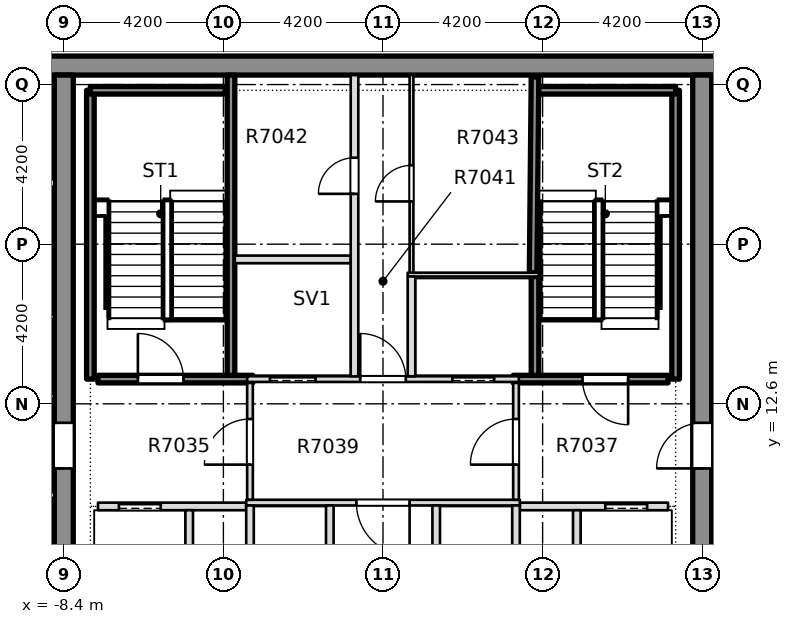
"""IFC4 building model, lengths in metres.
Left out: names, types, materials, properties, quantities, classifications, styles, units other than length and angle.
Written with IfcOpenShell. Run it as: python <this file> out.ifc"""

import sys

from ifc_helpers import new_model, si_unit, direction, frame, frame_2d, origin, place, context, subcontext, project, spatial, rectangle, extrude, element, fill, save


model = new_model("IFC4")
c1 = context("Model", 3, precision=1e-05, world=origin(), true_north=direction((0.0, 1.0)))
c2 = subcontext(c1, "Body", "Model", "MODEL_VIEW")
j1 = project(units=[si_unit("LENGTHUNIT", "METRE"), si_unit("PLANEANGLEUNIT", "RADIAN")], contexts=[c1])
p1 = place(None, origin())
s1 = spatial("IfcSite", under=j1, at=p1, CompositionType="ELEMENT")
p2 = place(p1, origin())
s2 = spatial("IfcBuilding", under=s1, at=p2, CompositionType="ELEMENT")
p3 = place(p2, frame((0.0, 0.0, 264.85)))
s3 = spatial("IfcBuildingStorey", under=s2, at=p3, CompositionType="ELEMENT", Elevation=264.85)
p4 = place(p3, frame((-12.1, 21.5, -0.5), z_axis=(0.0, 0.0, 1.0), x_axis=(1.0, 0.0, 0.0)))
e1 = element("IfcWall", 1, at=p4, inside=s3, PredefinedType="SHEAR", context=c2, shape_type="SweptSolid", body=[
    extrude(rectangle(XDim=24.2, YDim=0.5, at=frame_2d((12.1, 0.0))), origin(), (0.0, 0.0, 1.0), 4.5),
])
p5 = place(p3, frame((-8.4, -7.9, -0.5), z_axis=(0.0, 0.0, 1.0), x_axis=(0.0, 1.0, 0.0)))
e2 = element("IfcWall", 2, at=p5, inside=s3, PredefinedType="SHEAR", context=c2, shape_type="SweptSolid", body=[
    extrude(rectangle(XDim=29.15, YDim=0.5, at=frame_2d((14.575, 0.0))), origin(), (0.0, 0.0, 1.0), 4.5),
])
p6 = place(p5, frame((18.8, 0.0, 0.5)))
e3 = element("IfcOpeningElement", 3, at=p6, cuts=e2, PredefinedType="OPENING", context=c2, shape_type="SweptSolid", body=[
    extrude(rectangle(XDim=1.2, YDim=2.1, at=frame_2d((0.6, 1.05))), frame((0.0, 0.26, 0.0), z_axis=(0.0, -1.0, 0.0), x_axis=(1.0, 0.0, 0.0)), (0.0, 0.0, 1.0), 0.52),
])
p7 = place(p3, frame((8.4, -7.9, -0.5), z_axis=(0.0, 0.0, 1.0), x_axis=(0.0, 1.0, 0.0)))
e4 = element("IfcWall", 4, at=p7, inside=s3, PredefinedType="SHEAR", context=c2, shape_type="SweptSolid", body=[
    extrude(rectangle(XDim=29.15, YDim=0.5, at=frame_2d((14.575, 0.0))), origin(), (0.0, 0.0, 1.0), 4.5),
])
p8 = place(p7, frame((18.8, 0.0, 0.5)))
e5 = element("IfcOpeningElement", 5, at=p8, cuts=e4, PredefinedType="OPENING", context=c2, shape_type="SweptSolid", body=[
    extrude(rectangle(XDim=1.2, YDim=2.1, at=frame_2d((0.6, 1.05))), frame((0.0, 0.26, 0.0), z_axis=(0.0, -1.0, 0.0), x_axis=(1.0, 0.0, 0.0)), (0.0, 0.0, 1.0), 0.52),
])
p9 = place(p3, frame((-7.5, 9.9, 0.0), z_axis=(0.0, 0.0, 1.0), x_axis=(1.0, 0.0, 0.0)))
e6 = element("IfcWall", 6, at=p9, inside=s3, PredefinedType="PARTITIONING", context=c2, shape_type="SweptSolid", body=[
    extrude(rectangle(XDim=3.9, YDim=0.2, at=frame_2d((1.95, 0.0))), origin(), (0.0, 0.0, 1.0), 4.0),
])
p10 = place(p9, frame((0.55, 0.0, 0.0)))
e7 = element("IfcOpeningElement", 7, at=p10, cuts=e6, PredefinedType="OPENING", context=c2, shape_type="SweptSolid", body=[
    extrude(rectangle(XDim=1.1, YDim=2.1, at=frame_2d((0.55, 1.05))), frame((0.0, 0.11, 0.0), z_axis=(0.0, -1.0, 0.0), x_axis=(1.0, 0.0, 0.0)), (0.0, 0.0, 1.0), 0.22),
])
p11 = place(p3, frame((3.6, 9.9, 0.0), z_axis=(0.0, 0.0, 1.0), x_axis=(1.0, 0.0, 0.0)))
e8 = element("IfcWall", 8, at=p11, inside=s3, PredefinedType="PARTITIONING", context=c2, shape_type="SweptSolid", body=[
    extrude(rectangle(XDim=3.9, YDim=0.2, at=frame_2d((1.95, 0.0))), origin(), (0.0, 0.0, 1.0), 4.0),
])
p12 = place(p11, frame((2.25, 0.0, 0.0)))
e9 = element("IfcOpeningElement", 9, at=p12, cuts=e8, PredefinedType="OPENING", context=c2, shape_type="SweptSolid", body=[
    extrude(rectangle(XDim=1.1, YDim=2.1, at=frame_2d((0.55, 1.05))), frame((0.0, 0.11, 0.0), z_axis=(0.0, -1.0, 0.0), x_axis=(1.0, 0.0, 0.0)), (0.0, 0.0, 1.0), 0.22),
])
p13 = place(p3, frame((-3.6, 10.0, 0.0), z_axis=(0.0, 0.0, 1.0), x_axis=(1.0, 0.0, 0.0)))
e10 = element("IfcWall", 10, at=p13, inside=s3, PredefinedType="PARTITIONING", context=c2, shape_type="SweptSolid", body=[
    extrude(rectangle(XDim=7.2, YDim=0.15, at=frame_2d((3.6, 0.0))), origin(), (0.0, 0.0, 1.0), 4.0),
])
p14 = place(p13, frame((2.9, 0.0, 0.0)))
e11 = element("IfcOpeningElement", 11, at=p14, cuts=e10, PredefinedType="OPENING", context=c2, shape_type="SweptSolid", body=[
    extrude(rectangle(XDim=1.4, YDim=2.1, at=frame_2d((0.7, 1.05))), frame((0.0, 0.085, 0.0), z_axis=(0.0, -1.0, 0.0), x_axis=(1.0, 0.0, 0.0)), (0.0, 0.0, 1.0), 0.17),
])
p15 = place(p3, frame((-7.5, 13.25, 0.0), z_axis=(0.0, 0.0, 1.0), x_axis=(1.0, 0.0, 0.0)))
e12 = element("IfcWall", 12, at=p15, inside=s3, PredefinedType="SOLIDWALL", context=c2, shape_type="SweptSolid", body=[
    extrude(rectangle(XDim=4.075, YDim=0.2, at=frame_2d((2.038, 0.0))), origin(), (0.0, 0.0, 1.0), 4.0),
])
p16 = place(p15, frame((1.05, 0.0, 0.0)))
e13 = element("IfcOpeningElement", 13, at=p16, cuts=e12, PredefinedType="OPENING", context=c2, shape_type="SweptSolid", body=[
    extrude(rectangle(XDim=1.2, YDim=2.1, at=frame_2d((0.6, 1.05))), frame((0.0, 0.11, 0.0), z_axis=(0.0, -1.0, 0.0), x_axis=(1.0, 0.0, 0.0)), (0.0, 0.0, 1.0), 0.22),
])
p17 = place(p3, frame((-3.575, 13.25, 0.0), z_axis=(0.0, 0.0, 1.0), x_axis=(1.0, 0.0, 0.0)))
e14 = element("IfcWall", 14, at=p17, inside=s3, PredefinedType="PARTITIONING", context=c2, shape_type="SweptSolid", body=[
    extrude(rectangle(XDim=7.15, YDim=0.15, at=frame_2d((3.575, 0.0))), origin(), (0.0, 0.0, 1.0), 4.0),
])
p18 = place(p17, frame((0.6, 0.0, 0.0)))
e15 = element("IfcOpeningElement", 15, at=p18, cuts=e14, PredefinedType="OPENING", context=c2, shape_type="SweptSolid", body=[
    extrude(rectangle(XDim=1.2, YDim=2.1, at=frame_2d((0.6, 1.05))), frame((0.0, 0.085, 0.0), z_axis=(0.0, -1.0, 0.0), x_axis=(1.0, 0.0, 0.0)), (0.0, 0.0, 1.0), 0.17),
])
p19 = place(p17, frame((5.4, 0.0, 0.0)))
e16 = element("IfcOpeningElement", 16, at=p19, cuts=e14, PredefinedType="OPENING", context=c2, shape_type="SweptSolid", body=[
    extrude(rectangle(XDim=1.1, YDim=2.1, at=frame_2d((0.55, 1.05))), frame((0.0, 0.085, 0.0), z_axis=(0.0, -1.0, 0.0), x_axis=(1.0, 0.0, 0.0)), (0.0, 0.0, 1.0), 0.17),
])
p20 = place(p17, frame((2.975, 0.0, 0.0)))
e17 = element("IfcOpeningElement", 17, at=p20, cuts=e14, PredefinedType="OPENING", context=c2, shape_type="SweptSolid", body=[
    extrude(rectangle(XDim=1.2, YDim=2.1, at=frame_2d((0.6, 1.05))), frame((0.0, 0.085, 0.0), z_axis=(0.0, -1.0, 0.0), x_axis=(1.0, 0.0, 0.0)), (0.0, 0.0, 1.0), 0.17),
])
p21 = place(p3, frame((3.425, 13.25, 0.0), z_axis=(0.0, 0.0, 1.0), x_axis=(1.0, 0.0, 0.0)))
e18 = element("IfcWall", 18, at=p21, inside=s3, PredefinedType="SOLIDWALL", context=c2, shape_type="SweptSolid", body=[
    extrude(rectangle(XDim=4.075, YDim=0.2, at=frame_2d((2.038, 0.0))), origin(), (0.0, 0.0, 1.0), 4.0),
])
p22 = place(p21, frame((1.825, 0.0, 0.0)))
e19 = element("IfcOpeningElement", 19, at=p22, cuts=e18, PredefinedType="OPENING", context=c2, shape_type="SweptSolid", body=[
    extrude(rectangle(XDim=1.2, YDim=2.1, at=frame_2d((0.6, 1.05))), frame((0.0, 0.11, 0.0), z_axis=(0.0, -1.0, 0.0), x_axis=(1.0, 0.0, 0.0)), (0.0, 0.0, 1.0), 0.22),
])
p23 = place(p3, frame((0.65, 16.0, 0.0), z_axis=(0.0, 0.0, 1.0), x_axis=(1.0, 0.0, 0.0)))
e20 = element("IfcWall", 20, at=p23, inside=s3, PredefinedType="PARTITIONING", context=c2, shape_type="SweptSolid", body=[
    extrude(rectangle(XDim=3.45, YDim=0.1, at=frame_2d((1.725, 0.0))), origin(), (0.0, 0.0, 1.0), 4.0),
])
p24 = place(p3, frame((-3.9, 16.4, 0.0), z_axis=(0.0, 0.0, 1.0), x_axis=(1.0, 0.0, 0.0)))
e21 = element("IfcWall", 21, at=p24, inside=s3, PredefinedType="PARTITIONING", context=c2, shape_type="SweptSolid", body=[
    extrude(rectangle(XDim=3.05, YDim=0.2, at=frame_2d((1.525, 0.0))), origin(), (0.0, 0.0, 1.0), 4.0),
])
p25 = place(p3, frame((-5.1, 7.075, 0.0), z_axis=(0.0, 0.0, 1.0), x_axis=(0.0, 1.0, 0.0)))
e22 = element("IfcWall", 22, at=p25, inside=s3, PredefinedType="PARTITIONING", context=c2, shape_type="SweptSolid", body=[
    extrude(rectangle(XDim=2.725, YDim=0.2, at=frame_2d((1.363, 0.0))), origin(), (0.0, 0.0, 1.0), 4.0),
])
p26 = place(p3, frame((-4.0, 13.35, 0.0), z_axis=(0.0, 0.0, 1.0), x_axis=(0.0, 1.0, 0.0)))
e23 = element("IfcWall", 23, at=p26, inside=s3, PredefinedType="SOLIDWALL", context=c2, shape_type="SweptSolid", body=[
    extrude(rectangle(XDim=7.899, YDim=0.2, at=frame_2d((3.949, 0.0))), origin(), (0.0, 0.0, 1.0), 4.0),
])
p27 = place(p3, frame((-3.5, 7.075, 0.0), z_axis=(0.0, 0.0, 1.0), x_axis=(0.0, 1.0, 0.0)))
e24 = element("IfcWall", 24, at=p27, inside=s3, PredefinedType="PARTITIONING", context=c2, shape_type="SweptSolid", body=[
    extrude(rectangle(XDim=2.85, YDim=0.2, at=frame_2d((1.425, 0.0))), origin(), (0.0, 0.0, 1.0), 4.0),
])
p28 = place(p3, frame((-3.5, 10.075, 0.0), z_axis=(0.0, 0.0, 1.0), x_axis=(0.0, 1.0, 0.0)))
e25 = element("IfcWall", 25, at=p28, inside=s3, PredefinedType="PARTITIONING", context=c2, shape_type="SweptSolid", body=[
    extrude(rectangle(XDim=3.075, YDim=0.15, at=frame_2d((1.538, 0.0))), origin(), (0.0, 0.0, 1.0), 4.0),
])
p29 = place(p28, frame((0.925, 0.0, 0.0)))
e26 = element("IfcOpeningElement", 26, at=p29, cuts=e25, PredefinedType="OPENING", context=c2, shape_type="SweptSolid", body=[
    extrude(rectangle(XDim=1.2, YDim=2.1, at=frame_2d((0.6, 1.05))), frame((0.0, 0.085, 0.0), z_axis=(0.0, -1.0, 0.0), x_axis=(1.0, 0.0, 0.0)), (0.0, 0.0, 1.0), 0.17),
])
p30 = place(p3, frame((-1.4, 7.075, 0.0), z_axis=(0.0, 0.0, 1.0), x_axis=(0.0, 1.0, 0.0)))
e27 = element("IfcWall", 27, at=p30, inside=s3, PredefinedType="PARTITIONING", context=c2, shape_type="SweptSolid", body=[
    extrude(rectangle(XDim=2.85, YDim=0.2, at=frame_2d((1.425, 0.0))), origin(), (0.0, 0.0, 1.0), 4.0),
])
p31 = place(p3, frame((-0.75, 13.325, 0.0), z_axis=(0.0, 0.0, 1.0), x_axis=(0.0, 1.0, 0.0)))
e28 = element("IfcWall", 28, at=p31, inside=s3, PredefinedType="PARTITIONING", context=c2, shape_type="SweptSolid", body=[
    extrude(rectangle(XDim=7.924, YDim=0.2, at=frame_2d((3.962, 0.0))), origin(), (0.0, 0.0, 1.0), 4.0),
])
p32 = place(p31, frame((4.8, 0.0, 0.0)))
e29 = element("IfcOpeningElement", 29, at=p32, cuts=e28, PredefinedType="OPENING", context=c2, shape_type="SweptSolid", body=[
    extrude(rectangle(XDim=0.95, YDim=2.1, at=frame_2d((0.475, 1.05))), frame((0.0, 0.11, 0.0), z_axis=(0.0, -1.0, 0.0), x_axis=(1.0, 0.0, 0.0)), (0.0, 0.0, 1.0), 0.22),
])
p33 = place(p3, frame((0.75, 13.325, 0.0), z_axis=(0.0, 0.0, 1.0), x_axis=(0.0, 1.0, 0.0)))
e30 = element("IfcWall", 30, at=p33, inside=s3, PredefinedType="PARTITIONING", context=c2, shape_type="SweptSolid", body=[
    extrude(rectangle(XDim=2.625, YDim=0.2, at=frame_2d((1.312, 0.0))), origin(), (0.0, 0.0, 1.0), 4.0),
])
p34 = place(p3, frame((0.75, 16.05, 0.0), z_axis=(0.0, 0.0, 1.0), x_axis=(0.0, 1.0, 0.0)))
e31 = element("IfcWall", 31, at=p34, inside=s3, PredefinedType="PARTITIONING", context=c2, shape_type="SweptSolid", body=[
    extrude(rectangle(XDim=5.199, YDim=0.1, at=frame_2d((2.6, 0.0))), origin(), (0.0, 0.0, 1.0), 4.0),
])
p35 = place(p34, frame((1.875, 0.0, 0.0)))
e32 = element("IfcOpeningElement", 32, at=p35, cuts=e31, PredefinedType="OPENING", context=c2, shape_type="SweptSolid", body=[
    extrude(rectangle(XDim=0.95, YDim=2.1, at=frame_2d((0.475, 1.05))), frame((0.0, 0.06, 0.0), z_axis=(0.0, -1.0, 0.0), x_axis=(1.0, 0.0, 0.0)), (0.0, 0.0, 1.0), 0.12),
])
for number, where, z_axis, x_axis in (
    (33, (1.4, 7.075, 0.0), (0.0, 0.0, 1.0), (0.0, 1.0, 0.0)),
    (34, (3.5, 7.075, 0.0), (0.0, 0.0, 1.0), (0.0, 1.0, 0.0)),
):
    element("IfcWall", number, at=place(p3, frame(where, z_axis=z_axis, x_axis=x_axis)), inside=s3, PredefinedType="PARTITIONING", context=c2, shape_type="SweptSolid", body=[
        extrude(rectangle(XDim=2.85, YDim=0.2, at=frame_2d((1.425, 0.0))), origin(), (0.0, 0.0, 1.0), 4.0),
    ])
p36 = place(p3, frame((3.5, 10.075, 0.0), z_axis=(0.0, 0.0, 1.0), x_axis=(0.0, 1.0, 0.0)))
e35 = element("IfcWall", 35, at=p36, inside=s3, PredefinedType="PARTITIONING", context=c2, shape_type="SweptSolid", body=[
    extrude(rectangle(XDim=3.075, YDim=0.15, at=frame_2d((1.538, 0.0))), origin(), (0.0, 0.0, 1.0), 4.0),
])
p37 = place(p36, frame((0.925, 0.0, 0.0)))
e36 = element("IfcOpeningElement", 36, at=p37, cuts=e35, PredefinedType="OPENING", context=c2, shape_type="SweptSolid", body=[
    extrude(rectangle(XDim=1.2, YDim=2.1, at=frame_2d((0.6, 1.05))), frame((0.0, 0.085, 0.0), z_axis=(0.0, -1.0, 0.0), x_axis=(1.0, 0.0, 0.0)), (0.0, 0.0, 1.0), 0.17),
])
p38 = place(p3, frame((4.0, 13.35, 0.0), z_axis=(0.0, 0.0, 1.0), x_axis=(0.0, 1.0, 0.0)))
e37 = element("IfcWall", 37, at=p38, inside=s3, PredefinedType="SOLIDWALL", context=c2, shape_type="SweptSolid", body=[
    extrude(rectangle(XDim=2.6, YDim=0.2, at=frame_2d((1.3, 0.0))), origin(), (0.0, 0.0, 1.0), 4.0),
])
p39 = place(p3, frame((3.95, 16.05, 0.0), z_axis=(0.0, 0.0, 1.0), x_axis=(0.009719787395, 0.999952761751, 0.0)))
e38 = element("IfcWall", 38, at=p39, inside=s3, PredefinedType="SOLIDWALL", context=c2, shape_type="SweptSolid", body=[
    extrude(rectangle(XDim=5.149, YDim=0.2, at=frame_2d((2.575, 0.0))), origin(), (0.0, 0.0, 1.0), 4.0),
])
p40 = place(p3, frame((5.1, 7.075, 0.0), z_axis=(0.0, 0.0, 1.0), x_axis=(0.0, 1.0, 0.0)))
e39 = element("IfcWall", 39, at=p40, inside=s3, PredefinedType="PARTITIONING", context=c2, shape_type="SweptSolid", body=[
    extrude(rectangle(XDim=2.725, YDim=0.2, at=frame_2d((1.363, 0.0))), origin(), (0.0, 0.0, 1.0), 4.0),
])
p41 = place(p3, frame((-12.099, 10.2, 0.0), z_axis=(0.0, 0.0, 1.0), x_axis=(1.0, 0.0, 0.0)))
e40 = element("IfcWall", 40, at=p41, inside=s3, PredefinedType="PARTITIONING", context=c2, shape_type="SweptSolid", body=[
    extrude(rectangle(XDim=3.448, YDim=0.15, at=frame_2d((1.724, 0.0))), origin(), (0.0, 0.0, 1.0), 4.0),
])
p42 = place(p3, frame((-12.099, 12.8, 0.0), z_axis=(0.0, 0.0, 1.0), x_axis=(1.0, 0.0, 0.0)))
e41 = element("IfcWall", 41, at=p42, inside=s3, PredefinedType="PARTITIONING", context=c2, shape_type="SweptSolid", body=[
    extrude(rectangle(XDim=3.448, YDim=0.1, at=frame_2d((1.724, 0.0))), origin(), (0.0, 0.0, 1.0), 2.5),
])
p43 = place(p3, frame((-12.099, 14.891, 0.0), z_axis=(0.0, 0.0, 1.0), x_axis=(1.0, 0.0, 0.0)))
e42 = element("IfcWall", 42, at=p43, inside=s3, PredefinedType="PARTITIONING", context=c2, shape_type="SweptSolid", body=[
    extrude(rectangle(XDim=3.448, YDim=0.1, at=frame_2d((1.724, 0.0))), origin(), (0.0, 0.0, 1.0), 4.0),
])
p44 = place(p3, frame((-12.099, 18.411, 0.0), z_axis=(0.0, 0.0, 1.0), x_axis=(1.0, 0.0, 0.0)))
e43 = element("IfcWall", 43, at=p44, inside=s3, PredefinedType="PARTITIONING", context=c2, shape_type="SweptSolid", body=[
    extrude(rectangle(XDim=3.448, YDim=0.2, at=frame_2d((1.724, 0.0))), origin(), (0.0, 0.0, 1.0), 4.0),
])
p45 = place(p3, frame((8.651, 10.2, 0.0), z_axis=(0.0, 0.0, 1.0), x_axis=(1.0, 0.0, 0.0)))
e44 = element("IfcWall", 44, at=p45, inside=s3, PredefinedType="PARTITIONING", context=c2, shape_type="SweptSolid", body=[
    extrude(rectangle(XDim=3.448, YDim=0.1, at=frame_2d((1.724, 0.0))), origin(), (0.0, 0.0, 1.0), 4.0),
])
p46 = place(p3, frame((8.651, 12.8, 0.0), z_axis=(0.0, 0.0, 1.0), x_axis=(1.0, 0.0, 0.0)))
e45 = element("IfcWall", 45, at=p46, inside=s3, PredefinedType="PARTITIONING", context=c2, shape_type="SweptSolid", body=[
    extrude(rectangle(XDim=3.448, YDim=0.15, at=frame_2d((1.724, 0.0))), origin(), (0.0, 0.0, 1.0), 2.5),
])
p47 = place(p3, frame((8.651, 18.56, 0.0), z_axis=(0.0, 0.0, 1.0), x_axis=(1.0, 0.0, 0.0)))
e46 = element("IfcWall", 46, at=p47, inside=s3, PredefinedType="PARTITIONING", context=c2, shape_type="SweptSolid", body=[
    extrude(rectangle(XDim=3.448, YDim=0.2, at=frame_2d((1.724, 0.0))), origin(), (0.0, 0.0, 1.0), 4.0),
])
p48 = place(p3, frame((-7.7, 13.25, 0.0), z_axis=(0.0, 0.0, 1.0), x_axis=(0.0, 1.0, 0.0)))
e47 = element("IfcWall", 47, at=p48, inside=s3, PredefinedType="SOLIDWALL", context=c2, shape_type="SweptSolid", body=[
    extrude(rectangle(XDim=7.6, YDim=0.2, at=frame_2d((3.8, 0.0))), origin(), (0.0, 0.0, 1.0), 4.0),
])
p49 = place(p3, frame((-7.7, 20.85, 0.0), z_axis=(0.0, 0.0, 1.0), x_axis=(1.0, 0.0, 0.0)))
e48 = element("IfcWall", 48, at=p49, inside=s3, PredefinedType="SOLIDWALL", context=c2, shape_type="SweptSolid", body=[
    extrude(rectangle(XDim=3.55, YDim=0.2, at=frame_2d((1.775, 0.0))), origin(), (0.0, 0.0, 1.0), 4.0),
])
p50 = place(p3, frame((7.7, 13.25, 0.0), z_axis=(0.0, 0.0, 1.0), x_axis=(0.0, 1.0, 0.0)))
e49 = element("IfcWall", 49, at=p50, inside=s3, PredefinedType="SOLIDWALL", context=c2, shape_type="SweptSolid", body=[
    extrude(rectangle(XDim=7.6, YDim=0.2, at=frame_2d((3.8, 0.0))), origin(), (0.0, 0.0, 1.0), 4.0),
])
p51 = place(p3, frame((4.1, 20.85, 0.0), z_axis=(0.0, 0.0, 1.0), x_axis=(1.0, 0.0, 0.0)))
e50 = element("IfcWall", 50, at=p51, inside=s3, PredefinedType="SOLIDWALL", context=c2, shape_type="SweptSolid", body=[
    extrude(rectangle(XDim=3.6, YDim=0.2, at=frame_2d((1.8, 0.0))), origin(), (0.0, 0.0, 1.0), 4.0),
])
p52 = place(p16, origin())
e51 = element("IfcDoor", 51, at=p52, inside=s3, OperationType="SINGLE_SWING_LEFT", PredefinedType="DOOR", context=c2, shape_type="SweptSolid", body=[
    extrude(rectangle(XDim=1.2, YDim=2.1, at=frame_2d((0.6, 1.05))), frame((0.0, 0.025, 0.0), z_axis=(0.0, -1.0, 0.0), x_axis=(1.0, 0.0, 0.0)), (0.0, 0.0, 1.0), 0.05),
])
fill(e13, e51)
p53 = place(p10, origin())
e52 = element("IfcDoor", 52, at=p53, inside=s3, OperationType="SLIDING_TO_RIGHT", PredefinedType="DOOR", context=c2, shape_type="SweptSolid", body=[
    extrude(rectangle(XDim=1.1, YDim=2.1, at=frame_2d((0.55, 1.05))), frame((0.0, 0.025, 0.0), z_axis=(0.0, -1.0, 0.0), x_axis=(1.0, 0.0, 0.0)), (0.0, 0.0, 1.0), 0.05),
])
fill(e7, e52)
p54 = place(p22, origin())
e53 = element("IfcDoor", 53, at=p54, inside=s3, OperationType="SINGLE_SWING_RIGHT", PredefinedType="DOOR", context=c2, shape_type="SweptSolid", body=[
    extrude(rectangle(XDim=1.2, YDim=2.1, at=frame_2d((0.6, 1.05))), frame((0.0, 0.025, 0.0), z_axis=(0.0, -1.0, 0.0), x_axis=(1.0, 0.0, 0.0)), (0.0, 0.0, 1.0), 0.05),
])
fill(e19, e53)
p55 = place(p12, origin())
e54 = element("IfcDoor", 54, at=p55, inside=s3, OperationType="SLIDING_TO_LEFT", PredefinedType="DOOR", context=c2, shape_type="SweptSolid", body=[
    extrude(rectangle(XDim=1.1, YDim=2.1, at=frame_2d((0.55, 1.05))), frame((0.0, 0.025, 0.0), z_axis=(0.0, -1.0, 0.0), x_axis=(1.0, 0.0, 0.0)), (0.0, 0.0, 1.0), 0.05),
])
fill(e9, e54)
p56 = place(p14, origin())
e55 = element("IfcDoor", 55, at=p56, inside=s3, OperationType="SINGLE_SWING_RIGHT", PredefinedType="DOOR", context=c2, shape_type="SweptSolid", body=[
    extrude(rectangle(XDim=1.4, YDim=2.1, at=frame_2d((0.7, 1.05))), frame((0.0, 0.025, 0.0), z_axis=(0.0, -1.0, 0.0), x_axis=(1.0, 0.0, 0.0)), (0.0, 0.0, 1.0), 0.05),
])
fill(e11, e55)
p57 = place(p18, origin())
e56 = element("IfcDoor", 56, at=p57, inside=s3, OperationType="SLIDING_TO_RIGHT", PredefinedType="DOOR", context=c2, shape_type="SweptSolid", body=[
    extrude(rectangle(XDim=1.2, YDim=2.1, at=frame_2d((0.6, 1.05))), frame((0.0, 0.025, 0.0), z_axis=(0.0, -1.0, 0.0), x_axis=(1.0, 0.0, 0.0)), (0.0, 0.0, 1.0), 0.05),
])
fill(e15, e56)
p58 = place(p19, origin())
e57 = element("IfcDoor", 57, at=p58, inside=s3, OperationType="SLIDING_TO_LEFT", PredefinedType="DOOR", context=c2, shape_type="SweptSolid", body=[
    extrude(rectangle(XDim=1.1, YDim=2.1, at=frame_2d((0.55, 1.05))), frame((0.0, 0.025, 0.0), z_axis=(0.0, -1.0, 0.0), x_axis=(1.0, 0.0, 0.0)), (0.0, 0.0, 1.0), 0.05),
])
fill(e16, e57)
p59 = place(p20, origin())
e58 = element("IfcDoor", 58, at=p59, inside=s3, OperationType="SINGLE_SWING_RIGHT", PredefinedType="DOOR", context=c2, shape_type="SweptSolid", body=[
    extrude(rectangle(XDim=1.2, YDim=2.1, at=frame_2d((0.6, 1.05))), frame((0.0, 0.025, 0.0), z_axis=(0.0, -1.0, 0.0), x_axis=(1.0, 0.0, 0.0)), (0.0, 0.0, 1.0), 0.05),
])
fill(e17, e58)
p60 = place(p32, origin())
e59 = element("IfcDoor", 59, at=p60, inside=s3, OperationType="SINGLE_SWING_RIGHT", PredefinedType="DOOR", context=c2, shape_type="SweptSolid", body=[
    extrude(rectangle(XDim=0.95, YDim=2.1, at=frame_2d((0.475, 1.05))), frame((0.0, 0.025, 0.0), z_axis=(0.0, -1.0, 0.0), x_axis=(1.0, 0.0, 0.0)), (0.0, 0.0, 1.0), 0.05),
])
fill(e29, e59)
p61 = place(p35, origin())
e60 = element("IfcDoor", 60, at=p61, inside=s3, OperationType="SINGLE_SWING_LEFT", PredefinedType="DOOR", context=c2, shape_type="SweptSolid", body=[
    extrude(rectangle(XDim=0.95, YDim=2.1, at=frame_2d((0.475, 1.05))), frame((0.0, 0.025, 0.0), z_axis=(0.0, -1.0, 0.0), x_axis=(1.0, 0.0, 0.0)), (0.0, 0.0, 1.0), 0.05),
])
fill(e32, e60)
p62 = place(p29, origin())
e61 = element("IfcDoor", 61, at=p62, inside=s3, OperationType="SINGLE_SWING_RIGHT", PredefinedType="DOOR", context=c2, shape_type="SweptSolid", body=[
    extrude(rectangle(XDim=1.2, YDim=2.1, at=frame_2d((0.6, 1.05))), frame((0.0, 0.025, 0.0), z_axis=(0.0, -1.0, 0.0), x_axis=(1.0, 0.0, 0.0)), (0.0, 0.0, 1.0), 0.05),
])
fill(e26, e61)
p63 = place(p37, origin())
e62 = element("IfcDoor", 62, at=p63, inside=s3, OperationType="SINGLE_SWING_LEFT", PredefinedType="DOOR", context=c2, shape_type="SweptSolid", body=[
    extrude(rectangle(XDim=1.2, YDim=2.1, at=frame_2d((0.6, 1.05))), frame((0.0, 0.025, 0.0), z_axis=(0.0, -1.0, 0.0), x_axis=(1.0, 0.0, 0.0)), (0.0, 0.0, 1.0), 0.05),
])
fill(e36, e62)
p64 = place(p6, origin())
e63 = element("IfcDoor", 63, at=p64, inside=s3, OperationType="SINGLE_SWING_LEFT", PredefinedType="DOOR", context=c2, shape_type="SweptSolid", body=[
    extrude(rectangle(XDim=1.2, YDim=2.1, at=frame_2d((0.6, 1.05))), frame((0.0, 0.025, 0.0), z_axis=(0.0, -1.0, 0.0), x_axis=(1.0, 0.0, 0.0)), (0.0, 0.0, 1.0), 0.05),
])
fill(e3, e63)
p65 = place(p8, origin())
e64 = element("IfcDoor", 64, at=p65, inside=s3, OperationType="SINGLE_SWING_LEFT", PredefinedType="DOOR", context=c2, shape_type="SweptSolid", body=[
    extrude(rectangle(XDim=1.2, YDim=2.1, at=frame_2d((0.6, 1.05))), frame((0.0, 0.025, 0.0), z_axis=(0.0, -1.0, 0.0), x_axis=(1.0, 0.0, 0.0)), (0.0, 0.0, 1.0), 0.05),
])
fill(e5, e64)
save(model, sys.argv[1])
